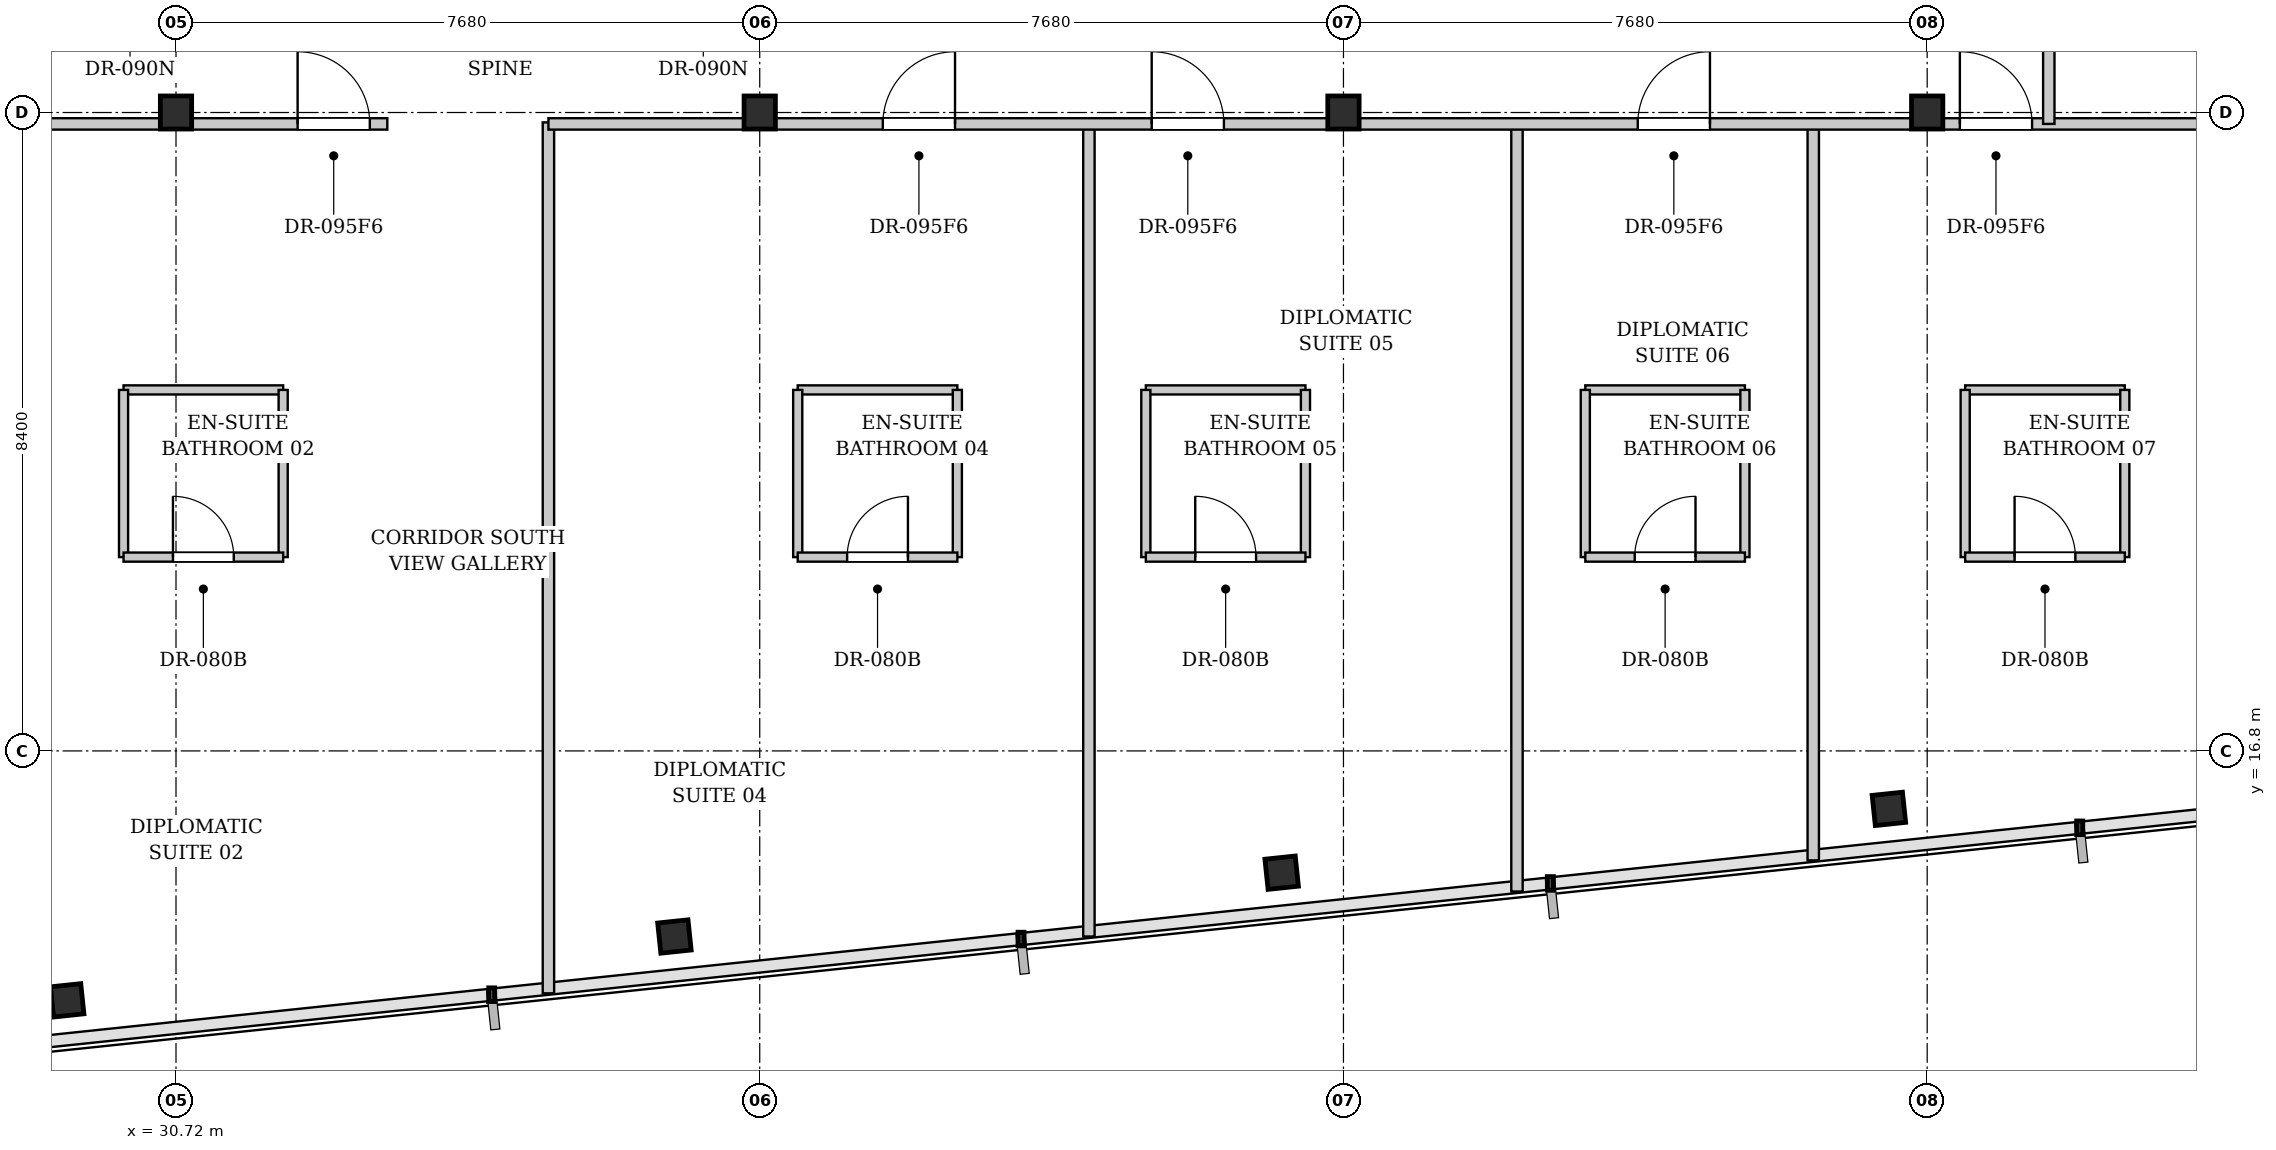
"""IFC4 building model, lengths in metres.
Left out: names, types, materials, properties, quantities, classifications, styles, units other than length and angle.
Written with IfcOpenShell. Run it as: python <this file> out.ifc"""

import sys

from ifc_helpers import new_model, si_unit, direction, frame, frame_2d, origin, origin_2d, place, context, subcontext, project, spatial, rectangle, i_section, extrude, element, fill, save


model = new_model("IFC4")
c1 = context("Model", 3, precision=1e-05, world=origin(), true_north=direction((0.0, 1.0)))
c2 = subcontext(c1, "Body", "Model", "MODEL_VIEW")
j1 = project(units=[si_unit("LENGTHUNIT", "METRE"), si_unit("PLANEANGLEUNIT", "RADIAN")], contexts=[c1])
p1 = place(None, origin())
s1 = spatial("IfcSite", under=j1, at=p1, CompositionType="ELEMENT")
p2 = place(p1, origin())
s2 = spatial("IfcBuilding", under=s1, at=p2, CompositionType="ELEMENT")
p3 = place(p2, frame((0.0, 0.0, 237.5)))
s3 = spatial("IfcBuildingStorey", under=s2, at=p3, CompositionType="ELEMENT", Elevation=237.5)
for number, where, z_axis, x_axis in (
    (1, (30.72, 25.2, 0.0), (0.0, 0.0, 1.0), (1.0, 0.0, 0.0)),
    (2, (38.4, 25.2, 0.0), (0.0, 0.0, 1.0), (1.0, 0.0, 0.0)),
    (3, (46.08, 25.2, 0.0), (0.0, 0.0, 1.0), (1.0, 0.0, 0.0)),
    (4, (53.76, 25.2, 0.0), (0.0, 0.0, 1.0), (1.0, 0.0, 0.0)),
):
    element("IfcColumn", number, at=place(p3, frame(where, z_axis=z_axis, x_axis=x_axis)), inside=s3, PredefinedType="COLUMN", context=c2, shape_type="SweptSolid", body=[
        extrude(i_section(OverallWidth=0.412, OverallDepth=0.435, WebThickness=0.036, FlangeThickness=0.058, FilletRadius=0.015, at=origin_2d()), origin(), (0.0, 0.0, 1.0), 3.3),
    ])
for number, where, z_axis, x_axis in (
    (5, (29.288, 13.518, 0.0), (0.0, 0.0, 1.0), (0.995, 0.105, 0.0)),
    (6, (37.278, 14.358, 0.0), (0.0, 0.0, 1.0), (0.995, 0.105, 0.0)),
    (7, (45.267, 15.198, 0.0), (0.0, 0.0, 1.0), (0.995, 0.105, 0.0)),
    (8, (53.256, 16.037, 0.0), (0.0, 0.0, 1.0), (0.995, 0.105, 0.0)),
):
    element("IfcColumn", number, at=place(p3, frame(where, z_axis=z_axis, x_axis=x_axis)), inside=s3, PredefinedType="COLUMN", context=c2, shape_type="SweptSolid", body=[
        extrude(i_section(OverallWidth=0.401, OverallDepth=0.399, WebThickness=0.025, FlangeThickness=0.04, FilletRadius=0.015, at=origin_2d()), origin(), (0.0, 0.0, 1.0), 3.3),
    ])
p4 = place(p3, frame((30.03, 21.55, 0.0), z_axis=(0.0, 0.0, 1.0), x_axis=(1.0, 0.0, 0.0)))
e9 = element("IfcWall", 9, at=p4, inside=s3, PredefinedType="PARTITIONING", context=c2, shape_type="SweptSolid", body=[
    extrude(rectangle(XDim=2.1, YDim=0.12, at=frame_2d((1.05, 0.0))), origin(), (0.0, 0.0, 1.0), 3.08),
])
p5 = place(p3, frame((30.03, 19.35, 0.0), z_axis=(0.0, 0.0, 1.0), x_axis=(0.0, 1.0, 0.0)))
e10 = element("IfcWall", 10, at=p5, inside=s3, PredefinedType="PARTITIONING", context=c2, shape_type="SweptSolid", body=[
    extrude(rectangle(XDim=2.2, YDim=0.12, at=frame_2d((1.1, 0.0))), origin(), (0.0, 0.0, 1.0), 2.313),
])
p6 = place(p3, frame((32.13, 19.35, 0.0), z_axis=(0.0, 0.0, 1.0), x_axis=(0.0, 1.0, 0.0)))
e11 = element("IfcWall", 11, at=p6, inside=s3, PredefinedType="PARTITIONING", context=c2, shape_type="SweptSolid", body=[
    extrude(rectangle(XDim=2.2, YDim=0.12, at=frame_2d((1.1, 0.0))), origin(), (0.0, 0.0, 1.0), 3.08),
])
p7 = place(p3, frame((30.03, 19.35, 0.0), z_axis=(0.0, 0.0, 1.0), x_axis=(1.0, 0.0, 0.0)))
e12 = element("IfcWall", 12, at=p7, inside=s3, PredefinedType="PARTITIONING", context=c2, shape_type="SweptSolid", body=[
    extrude(rectangle(XDim=2.1, YDim=0.12, at=frame_2d((1.05, 0.0))), origin(), (0.0, 0.0, 1.0), 3.08),
])
p8 = place(p7, frame((0.65, 0.0, 0.0)))
e13 = element("IfcOpeningElement", 13, at=p8, cuts=e12, PredefinedType="OPENING", context=c2, shape_type="SweptSolid", body=[
    extrude(rectangle(XDim=0.8, YDim=2.1, at=frame_2d((0.4, 1.05))), frame((0.0, 0.07, 0.0), z_axis=(0.0, -1.0, 0.0), x_axis=(1.0, 0.0, 0.0)), (0.0, 0.0, 1.0), 0.14),
])
p9 = place(p3, frame((38.9, 21.55, 0.0), z_axis=(0.0, 0.0, 1.0), x_axis=(1.0, 0.0, 0.0)))
e14 = element("IfcWall", 14, at=p9, inside=s3, PredefinedType="PARTITIONING", context=c2, shape_type="SweptSolid", body=[
    extrude(rectangle(XDim=2.1, YDim=0.12, at=frame_2d((1.05, 0.0))), origin(), (0.0, 0.0, 1.0), 3.08),
])
for number, where, z_axis, x_axis in (
    (15, (38.9, 19.35, 0.0), (0.0, 0.0, 1.0), (0.0, 1.0, 0.0)),
    (16, (41.0, 19.35, 0.0), (0.0, 0.0, 1.0), (0.0, 1.0, 0.0)),
):
    element("IfcWall", number, at=place(p3, frame(where, z_axis=z_axis, x_axis=x_axis)), inside=s3, PredefinedType="PARTITIONING", context=c2, shape_type="SweptSolid", body=[
        extrude(rectangle(XDim=2.2, YDim=0.12, at=frame_2d((1.1, 0.0))), origin(), (0.0, 0.0, 1.0), 3.08),
    ])
p10 = place(p3, frame((38.9, 19.35, 0.0), z_axis=(0.0, 0.0, 1.0), x_axis=(1.0, 0.0, 0.0)))
e17 = element("IfcWall", 17, at=p10, inside=s3, PredefinedType="PARTITIONING", context=c2, shape_type="SweptSolid", body=[
    extrude(rectangle(XDim=2.1, YDim=0.12, at=frame_2d((1.05, 0.0))), origin(), (0.0, 0.0, 1.0), 3.08),
])
p11 = place(p10, frame((0.65, 0.0, 0.0)))
e18 = element("IfcOpeningElement", 18, at=p11, cuts=e17, PredefinedType="OPENING", context=c2, shape_type="SweptSolid", body=[
    extrude(rectangle(XDim=0.8, YDim=2.1, at=frame_2d((0.4, 1.05))), frame((0.0, 0.07, 0.0), z_axis=(0.0, -1.0, 0.0), x_axis=(1.0, 0.0, 0.0)), (0.0, 0.0, 1.0), 0.14),
])
p12 = place(p3, frame((35.62, 13.611, 0.0), z_axis=(0.0, 0.0, 1.0), x_axis=(0.0, 1.0, 0.0)))
e19 = element("IfcWall", 19, at=p12, inside=s3, PredefinedType="PARTITIONING", context=c2, shape_type="SweptSolid", body=[
    extrude(rectangle(XDim=11.459, YDim=0.15, at=frame_2d((5.73, 0.0))), origin(), (0.0, 0.0, 1.0), 3.08),
])
p13 = place(p3, frame((43.48, 21.55, 0.0), z_axis=(0.0, 0.0, 1.0), x_axis=(1.0, 0.0, 0.0)))
e20 = element("IfcWall", 20, at=p13, inside=s3, PredefinedType="PARTITIONING", context=c2, shape_type="SweptSolid", body=[
    extrude(rectangle(XDim=2.1, YDim=0.12, at=frame_2d((1.05, 0.0))), origin(), (0.0, 0.0, 1.0), 3.08),
])
p14 = place(p3, frame((43.48, 19.35, 0.0), z_axis=(0.0, 0.0, 1.0), x_axis=(0.0, 1.0, 0.0)))
e21 = element("IfcWall", 21, at=p14, inside=s3, PredefinedType="PARTITIONING", context=c2, shape_type="SweptSolid", body=[
    extrude(rectangle(XDim=2.2, YDim=0.12, at=frame_2d((1.1, 0.0))), origin(), (0.0, 0.0, 1.0), 3.08),
])
p15 = place(p3, frame((45.58, 19.35, 0.0), z_axis=(0.0, 0.0, 1.0), x_axis=(0.0, 1.0, 0.0)))
e22 = element("IfcWall", 22, at=p15, inside=s3, PredefinedType="PARTITIONING", context=c2, shape_type="SweptSolid", body=[
    extrude(rectangle(XDim=2.2, YDim=0.12, at=frame_2d((1.1, 0.0))), origin(), (0.0, 0.0, 1.0), 2.313),
])
p16 = place(p3, frame((43.48, 19.35, 0.0), z_axis=(0.0, 0.0, 1.0), x_axis=(1.0, 0.0, 0.0)))
e23 = element("IfcWall", 23, at=p16, inside=s3, PredefinedType="PARTITIONING", context=c2, shape_type="SweptSolid", body=[
    extrude(rectangle(XDim=2.1, YDim=0.12, at=frame_2d((1.05, 0.0))), origin(), (0.0, 0.0, 1.0), 3.08),
])
p17 = place(p16, frame((0.65, 0.0, 0.0)))
e24 = element("IfcOpeningElement", 24, at=p17, cuts=e23, PredefinedType="OPENING", context=c2, shape_type="SweptSolid", body=[
    extrude(rectangle(XDim=0.8, YDim=2.1, at=frame_2d((0.4, 1.05))), frame((0.0, 0.07, 0.0), z_axis=(0.0, -1.0, 0.0), x_axis=(1.0, 0.0, 0.0)), (0.0, 0.0, 1.0), 0.14),
])
p18 = place(p3, frame((42.731, 14.358, 0.0), z_axis=(0.0, 0.0, 1.0), x_axis=(0.0, 1.0, 0.0)))
e25 = element("IfcWall", 25, at=p18, inside=s3, PredefinedType="PARTITIONING", context=c2, shape_type="SweptSolid", body=[
    extrude(rectangle(XDim=10.712, YDim=0.15, at=frame_2d((5.356, 0.0))), origin(), (0.0, 0.0, 1.0), 3.08),
])
p19 = place(p3, frame((49.262, 21.55, 0.0), z_axis=(0.0, 0.0, 1.0), x_axis=(1.0, 0.0, 0.0)))
e26 = element("IfcWall", 26, at=p19, inside=s3, PredefinedType="PARTITIONING", context=c2, shape_type="SweptSolid", body=[
    extrude(rectangle(XDim=2.1, YDim=0.12, at=frame_2d((1.05, 0.0))), origin(), (0.0, 0.0, 1.0), 3.08),
])
for number, where, z_axis, x_axis in (
    (27, (49.262, 19.35, 0.0), (0.0, 0.0, 1.0), (0.0, 1.0, 0.0)),
    (28, (51.362, 19.35, 0.0), (0.0, 0.0, 1.0), (0.0, 1.0, 0.0)),
):
    element("IfcWall", number, at=place(p3, frame(where, z_axis=z_axis, x_axis=x_axis)), inside=s3, PredefinedType="PARTITIONING", context=c2, shape_type="SweptSolid", body=[
        extrude(rectangle(XDim=2.2, YDim=0.12, at=frame_2d((1.1, 0.0))), origin(), (0.0, 0.0, 1.0), 3.08),
    ])
p20 = place(p3, frame((49.262, 19.35, 0.0), z_axis=(0.0, 0.0, 1.0), x_axis=(1.0, 0.0, 0.0)))
e29 = element("IfcWall", 29, at=p20, inside=s3, PredefinedType="PARTITIONING", context=c2, shape_type="SweptSolid", body=[
    extrude(rectangle(XDim=2.1, YDim=0.12, at=frame_2d((1.05, 0.0))), origin(), (0.0, 0.0, 1.0), 3.08),
])
p21 = place(p20, frame((0.65, 0.0, 0.0)))
e30 = element("IfcOpeningElement", 30, at=p21, cuts=e29, PredefinedType="OPENING", context=c2, shape_type="SweptSolid", body=[
    extrude(rectangle(XDim=0.8, YDim=2.1, at=frame_2d((0.4, 1.05))), frame((0.0, 0.07, 0.0), z_axis=(0.0, -1.0, 0.0), x_axis=(1.0, 0.0, 0.0)), (0.0, 0.0, 1.0), 0.14),
])
p22 = place(p3, frame((48.363, 14.95, 0.0), z_axis=(0.0, 0.0, 1.0), x_axis=(0.0, 1.0, 0.0)))
e31 = element("IfcWall", 31, at=p22, inside=s3, PredefinedType="PARTITIONING", context=c2, shape_type="SweptSolid", body=[
    extrude(rectangle(XDim=10.12, YDim=0.15, at=frame_2d((5.06, 0.0))), origin(), (0.0, 0.0, 1.0), 3.08),
])
p23 = place(p3, frame((54.26, 21.55, 0.0), z_axis=(0.0, 0.0, 1.0), x_axis=(1.0, 0.0, 0.0)))
e32 = element("IfcWall", 32, at=p23, inside=s3, PredefinedType="PARTITIONING", context=c2, shape_type="SweptSolid", body=[
    extrude(rectangle(XDim=2.1, YDim=0.12, at=frame_2d((1.05, 0.0))), origin(), (0.0, 0.0, 1.0), 3.08),
])
for number, where, z_axis, x_axis in (
    (33, (54.26, 19.35, 0.0), (0.0, 0.0, 1.0), (0.0, 1.0, 0.0)),
    (34, (56.36, 19.35, 0.0), (0.0, 0.0, 1.0), (0.0, 1.0, 0.0)),
):
    element("IfcWall", number, at=place(p3, frame(where, z_axis=z_axis, x_axis=x_axis)), inside=s3, PredefinedType="PARTITIONING", context=c2, shape_type="SweptSolid", body=[
        extrude(rectangle(XDim=2.2, YDim=0.12, at=frame_2d((1.1, 0.0))), origin(), (0.0, 0.0, 1.0), 3.08),
    ])
p24 = place(p3, frame((54.26, 19.35, 0.0), z_axis=(0.0, 0.0, 1.0), x_axis=(1.0, 0.0, 0.0)))
e35 = element("IfcWall", 35, at=p24, inside=s3, PredefinedType="PARTITIONING", context=c2, shape_type="SweptSolid", body=[
    extrude(rectangle(XDim=2.1, YDim=0.12, at=frame_2d((1.05, 0.0))), origin(), (0.0, 0.0, 1.0), 3.08),
])
p25 = place(p24, frame((0.65, 0.0, 0.0)))
e36 = element("IfcOpeningElement", 36, at=p25, cuts=e35, PredefinedType="OPENING", context=c2, shape_type="SweptSolid", body=[
    extrude(rectangle(XDim=0.8, YDim=2.1, at=frame_2d((0.4, 1.05))), frame((0.0, 0.07, 0.0), z_axis=(0.0, -1.0, 0.0), x_axis=(1.0, 0.0, 0.0)), (0.0, 0.0, 1.0), 0.14),
])
p26 = place(p3, frame((52.261, 15.36, 0.0), z_axis=(0.0, 0.0, 1.0), x_axis=(0.0, 1.0, 0.0)))
e37 = element("IfcWall", 37, at=p26, inside=s3, PredefinedType="PARTITIONING", context=c2, shape_type="SweptSolid", body=[
    extrude(rectangle(XDim=9.71, YDim=0.15, at=frame_2d((4.855, 0.0))), origin(), (0.0, 0.0, 1.0), 3.08),
])
p27 = place(p3, frame((17.314, 25.05, 0.0), z_axis=(0.0, 0.0, 1.0), x_axis=(1.0, 0.0, 0.0)))
e38 = element("IfcWall", 38, at=p27, inside=s3, PredefinedType="PARTITIONING", context=c2, shape_type="SweptSolid", body=[
    extrude(rectangle(XDim=16.186, YDim=0.15, at=frame_2d((8.093, 0.0))), origin(), (0.0, 0.0, 1.0), 2.313),
])
p28 = place(p27, frame((8.981, 0.0, 0.0)))
e39 = element("IfcOpeningElement", 39, at=p28, cuts=e38, PredefinedType="OPENING", context=c2, shape_type="SweptSolid", body=[
    extrude(rectangle(XDim=0.95, YDim=2.15, at=frame_2d((0.475, 1.075))), frame((0.0, 0.085, 0.0), z_axis=(0.0, -1.0, 0.0), x_axis=(1.0, 0.0, 0.0)), (0.0, 0.0, 1.0), 0.17),
])
p29 = place(p27, frame((15.006, 0.0, 0.0)))
e40 = element("IfcOpeningElement", 40, at=p29, cuts=e38, PredefinedType="OPENING", context=c2, shape_type="SweptSolid", body=[
    extrude(rectangle(XDim=0.95, YDim=2.15, at=frame_2d((0.475, 1.075))), frame((0.0, 0.085, 0.0), z_axis=(0.0, -1.0, 0.0), x_axis=(1.0, 0.0, 0.0)), (0.0, 0.0, 1.0), 0.17),
])
p30 = place(p3, frame((35.62, 25.05, 0.0), z_axis=(0.0, 0.0, 1.0), x_axis=(1.0, 0.0, 0.0)))
e41 = element("IfcWall", 41, at=p30, inside=s3, PredefinedType="PARTITIONING", context=c2, shape_type="SweptSolid", body=[
    extrude(rectangle(XDim=35.529, YDim=0.15, at=frame_2d((17.764, 0.0))), origin(), (0.0, 0.0, 1.0), 2.313),
])
p31 = place(p30, frame((4.399, 0.0, 0.0)))
e42 = element("IfcOpeningElement", 42, at=p31, cuts=e41, PredefinedType="OPENING", context=c2, shape_type="SweptSolid", body=[
    extrude(rectangle(XDim=0.95, YDim=2.15, at=frame_2d((0.475, 1.075))), frame((0.0, 0.085, 0.0), z_axis=(0.0, -1.0, 0.0), x_axis=(1.0, 0.0, 0.0)), (0.0, 0.0, 1.0), 0.17),
])
p32 = place(p30, frame((7.937, 0.0, 0.0)))
e43 = element("IfcOpeningElement", 43, at=p32, cuts=e41, PredefinedType="OPENING", context=c2, shape_type="SweptSolid", body=[
    extrude(rectangle(XDim=0.95, YDim=2.15, at=frame_2d((0.475, 1.075))), frame((0.0, 0.085, 0.0), z_axis=(0.0, -1.0, 0.0), x_axis=(1.0, 0.0, 0.0)), (0.0, 0.0, 1.0), 0.17),
])
p33 = place(p30, frame((14.332, 0.0, 0.0)))
e44 = element("IfcOpeningElement", 44, at=p33, cuts=e41, PredefinedType="OPENING", context=c2, shape_type="SweptSolid", body=[
    extrude(rectangle(XDim=0.95, YDim=2.15, at=frame_2d((0.475, 1.075))), frame((0.0, 0.085, 0.0), z_axis=(0.0, -1.0, 0.0), x_axis=(1.0, 0.0, 0.0)), (0.0, 0.0, 1.0), 0.17),
])
p34 = place(p30, frame((18.57, 0.0, 0.0)))
e45 = element("IfcOpeningElement", 45, at=p34, cuts=e41, PredefinedType="OPENING", context=c2, shape_type="SweptSolid", body=[
    extrude(rectangle(XDim=0.95, YDim=2.15, at=frame_2d((0.475, 1.075))), frame((0.0, 0.085, 0.0), z_axis=(0.0, -1.0, 0.0), x_axis=(1.0, 0.0, 0.0)), (0.0, 0.0, 1.0), 0.17),
])
p35 = place(p3, frame((55.36, 25.05, 0.0), z_axis=(0.0, 0.0, 1.0), x_axis=(0.0, 1.0, 0.0)))
e46 = element("IfcWall", 46, at=p35, inside=s3, PredefinedType="PARTITIONING", context=c2, shape_type="SweptSolid", body=[
    extrude(rectangle(XDim=24.863, YDim=0.15, at=frame_2d((12.431, 0.0))), origin(), (0.0, 0.0, 1.0), 3.08),
])
p36 = place(p35, frame((1.03, 0.0, 0.0)))
e47 = element("IfcOpeningElement", 47, at=p36, cuts=e46, PredefinedType="OPENING", context=c2, shape_type="SweptSolid", body=[
    extrude(rectangle(XDim=0.9, YDim=2.15, at=frame_2d((0.45, 1.075))), frame((0.0, 0.085, 0.0), z_axis=(0.0, -1.0, 0.0), x_axis=(1.0, 0.0, 0.0)), (0.0, 0.0, 1.0), 0.17),
])
p37 = place(p8, origin())
e48 = element("IfcDoor", 48, at=p37, inside=s3, OperationType="SINGLE_SWING_LEFT", PredefinedType="DOOR", context=c2, shape_type="SweptSolid", body=[
    extrude(rectangle(XDim=0.8, YDim=2.1, at=frame_2d((0.4, 1.05))), frame((0.0, 0.025, 0.0), z_axis=(0.0, -1.0, 0.0), x_axis=(1.0, 0.0, 0.0)), (0.0, 0.0, 1.0), 0.05),
])
fill(e13, e48)
p38 = place(p11, origin())
e49 = element("IfcDoor", 49, at=p38, inside=s3, OperationType="SINGLE_SWING_RIGHT", PredefinedType="DOOR", context=c2, shape_type="SweptSolid", body=[
    extrude(rectangle(XDim=0.8, YDim=2.1, at=frame_2d((0.4, 1.05))), frame((0.0, 0.025, 0.0), z_axis=(0.0, -1.0, 0.0), x_axis=(1.0, 0.0, 0.0)), (0.0, 0.0, 1.0), 0.05),
])
fill(e18, e49)
p39 = place(p17, origin())
e50 = element("IfcDoor", 50, at=p39, inside=s3, OperationType="SINGLE_SWING_LEFT", PredefinedType="DOOR", context=c2, shape_type="SweptSolid", body=[
    extrude(rectangle(XDim=0.8, YDim=2.1, at=frame_2d((0.4, 1.05))), frame((0.0, 0.025, 0.0), z_axis=(0.0, -1.0, 0.0), x_axis=(1.0, 0.0, 0.0)), (0.0, 0.0, 1.0), 0.05),
])
fill(e24, e50)
p40 = place(p21, origin())
e51 = element("IfcDoor", 51, at=p40, inside=s3, OperationType="SINGLE_SWING_RIGHT", PredefinedType="DOOR", context=c2, shape_type="SweptSolid", body=[
    extrude(rectangle(XDim=0.8, YDim=2.1, at=frame_2d((0.4, 1.05))), frame((0.0, 0.025, 0.0), z_axis=(0.0, -1.0, 0.0), x_axis=(1.0, 0.0, 0.0)), (0.0, 0.0, 1.0), 0.05),
])
fill(e30, e51)
p41 = place(p25, origin())
e52 = element("IfcDoor", 52, at=p41, inside=s3, OperationType="SINGLE_SWING_LEFT", PredefinedType="DOOR", context=c2, shape_type="SweptSolid", body=[
    extrude(rectangle(XDim=0.8, YDim=2.1, at=frame_2d((0.4, 1.05))), frame((0.0, 0.025, 0.0), z_axis=(0.0, -1.0, 0.0), x_axis=(1.0, 0.0, 0.0)), (0.0, 0.0, 1.0), 0.05),
])
fill(e36, e52)
p42 = place(p29, origin())
e53 = element("IfcDoor", 53, at=p42, inside=s3, OperationType="SINGLE_SWING_LEFT", PredefinedType="DOOR", context=c2, shape_type="SweptSolid", body=[
    extrude(rectangle(XDim=0.95, YDim=2.15, at=frame_2d((0.475, 1.075))), frame((0.0, 0.025, 0.0), z_axis=(0.0, -1.0, 0.0), x_axis=(1.0, 0.0, 0.0)), (0.0, 0.0, 1.0), 0.05),
])
fill(e40, e53)
p43 = place(p31, origin())
e54 = element("IfcDoor", 54, at=p43, inside=s3, OperationType="SINGLE_SWING_RIGHT", PredefinedType="DOOR", context=c2, shape_type="SweptSolid", body=[
    extrude(rectangle(XDim=0.95, YDim=2.15, at=frame_2d((0.475, 1.075))), frame((0.0, 0.025, 0.0), z_axis=(0.0, -1.0, 0.0), x_axis=(1.0, 0.0, 0.0)), (0.0, 0.0, 1.0), 0.05),
])
fill(e42, e54)
p44 = place(p32, origin())
e55 = element("IfcDoor", 55, at=p44, inside=s3, OperationType="SINGLE_SWING_LEFT", PredefinedType="DOOR", context=c2, shape_type="SweptSolid", body=[
    extrude(rectangle(XDim=0.95, YDim=2.15, at=frame_2d((0.475, 1.075))), frame((0.0, 0.025, 0.0), z_axis=(0.0, -1.0, 0.0), x_axis=(1.0, 0.0, 0.0)), (0.0, 0.0, 1.0), 0.05),
])
fill(e43, e55)
p45 = place(p33, origin())
e56 = element("IfcDoor", 56, at=p45, inside=s3, OperationType="SINGLE_SWING_RIGHT", PredefinedType="DOOR", context=c2, shape_type="SweptSolid", body=[
    extrude(rectangle(XDim=0.95, YDim=2.15, at=frame_2d((0.475, 1.075))), frame((0.0, 0.025, 0.0), z_axis=(0.0, -1.0, 0.0), x_axis=(1.0, 0.0, 0.0)), (0.0, 0.0, 1.0), 0.05),
])
fill(e44, e56)
p46 = place(p34, origin())
e57 = element("IfcDoor", 57, at=p46, inside=s3, OperationType="SINGLE_SWING_LEFT", PredefinedType="DOOR", context=c2, shape_type="SweptSolid", body=[
    extrude(rectangle(XDim=0.95, YDim=2.15, at=frame_2d((0.475, 1.075))), frame((0.0, 0.025, 0.0), z_axis=(0.0, -1.0, 0.0), x_axis=(1.0, 0.0, 0.0)), (0.0, 0.0, 1.0), 0.05),
])
fill(e45, e57)
save(model, sys.argv[1])
